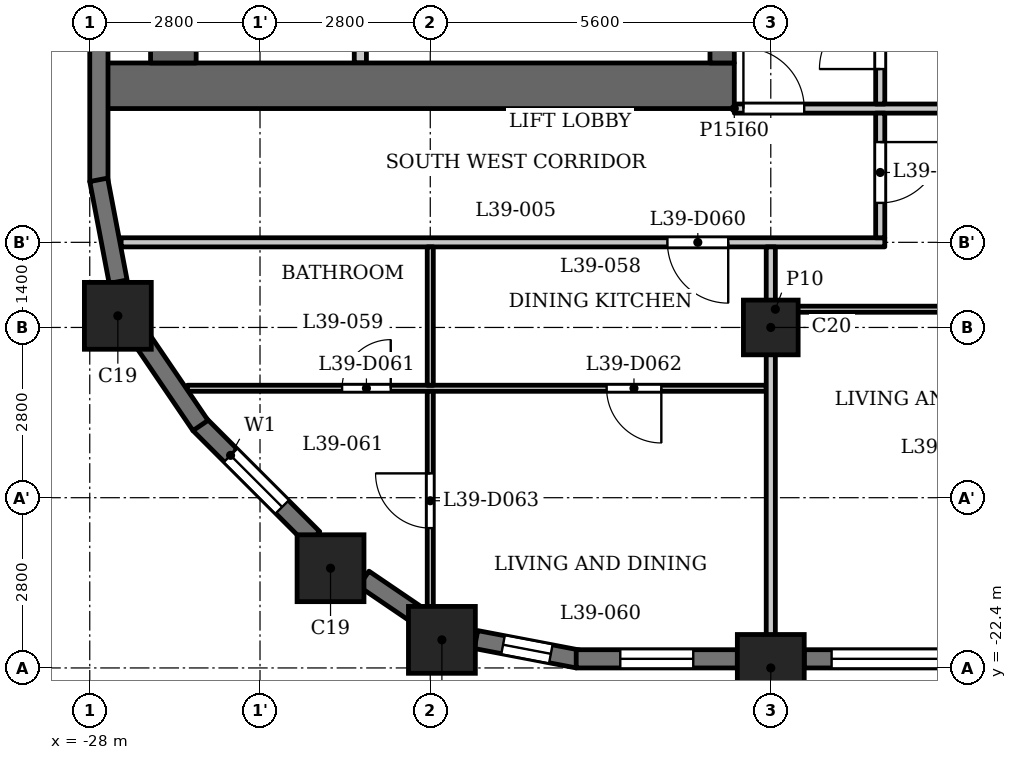
"""IFC4 building model, lengths in metres.
Left out: names, types, materials, properties, quantities, classifications, styles, units other than length and angle.
Written with IfcOpenShell. Run it as: python <this file> out.ifc"""

import sys

from ifc_helpers import new_model, si_unit, direction, frame, frame_2d, origin, origin_2d, place, context, subcontext, project, spatial, rectangle, extrude, element, fill, save


model = new_model("IFC4")
c1 = context("Model", 3, precision=1e-05, world=origin(), true_north=direction((0.0, 1.0)))
c2 = subcontext(c1, "Body", "Model", "MODEL_VIEW")
j1 = project(units=[si_unit("LENGTHUNIT", "METRE"), si_unit("PLANEANGLEUNIT", "RADIAN")], contexts=[c1])
p1 = place(None, origin())
s1 = spatial("IfcSite", under=j1, at=p1, CompositionType="ELEMENT")
p2 = place(p1, origin())
s2 = spatial("IfcBuilding", under=s1, at=p2, CompositionType="ELEMENT")
p3 = place(p2, frame((0.0, 0.0, 153.6)))
s3 = spatial("IfcBuildingStorey", under=s2, at=p3, CompositionType="ELEMENT", Elevation=153.6)
for number, where, z_axis, x_axis in (
    (1, (-22.209, -21.938, 0.0), (0.0, 0.0, 1.0), (1.0, 0.0, 0.0)),
    (2, (-16.8, -22.4, 0.0), (0.0, 0.0, 1.0), (1.0, 0.0, 0.0)),
    (3, (-27.538, -16.609, 0.0), (0.0, 0.0, 1.0), (1.0, 0.0, 0.0)),
    (4, (-24.04, -20.76, 0.0), (0.0, 0.0, 1.0), (1.0, 0.0, 0.0)),
):
    element("IfcColumn", number, at=place(p3, frame(where, z_axis=z_axis, x_axis=x_axis)), inside=s3, PredefinedType="COLUMN", context=c2, shape_type="SweptSolid", body=[
        extrude(rectangle(XDim=1.1, YDim=1.1, at=origin_2d()), origin(), (0.0, 0.0, 1.0), 3.5),
    ])
p4 = place(p3, frame((-16.8, -16.8, 0.0), z_axis=(0.0, 0.0, 1.0), x_axis=(1.0, 0.0, 0.0)))
e5 = element("IfcColumn", 5, at=p4, inside=s3, PredefinedType="COLUMN", context=c2, shape_type="SweptSolid", body=[
    extrude(rectangle(XDim=0.9, YDim=0.9, at=origin_2d()), origin(), (0.0, 0.0, 1.0), 3.5),
])
p5 = place(p3, frame((-26.197, -18.391, 0.0), z_axis=(0.0, 0.0, 1.0), x_axis=(0.707060717099, -0.707152842274, 0.0)))
e6 = element("IfcWall", 6, at=p5, inside=s3, PredefinedType="SOLIDWALL", context=c2, shape_type="SweptSolid", body=[
    extrude(rectangle(XDim=2.65, YDim=0.3, at=frame_2d((1.325, 0.0))), origin(), (0.0, 0.0, 1.0), 2.45),
])
p6 = place(p5, frame((0.725, 0.0, 0.6)))
e7 = element("IfcOpeningElement", 7, at=p6, cuts=e6, PredefinedType="OPENING", context=c2, shape_type="SweptSolid", body=[
    extrude(rectangle(XDim=1.2, YDim=1.55, at=frame_2d((0.6, 0.775))), frame((0.0, 0.16, 0.0), z_axis=(0.0, -1.0, 0.0), x_axis=(1.0, 0.0, 0.0)), (0.0, 0.0, 1.0), 0.32),
])
p7 = place(p3, frame((-23.492, -20.932, 0.0), z_axis=(0.0, 0.0, 1.0), x_axis=(0.826993959827, -0.562210806023, 0.0)))
e8 = element("IfcWall", 8, at=p7, inside=s3, PredefinedType="SOLIDWALL", context=c2, shape_type="SweptSolid", body=[
    extrude(rectangle(XDim=1.077, YDim=0.3, at=frame_2d((0.539, 0.0))), origin(), (0.0, 0.0, 1.0), 3.2),
])
p8 = place(p3, frame((-21.648, -21.933, 0.0), z_axis=(0.0, 0.0, 1.0), x_axis=(0.982297206936, -0.187329114784, 0.0)))
e9 = element("IfcWall", 9, at=p8, inside=s3, PredefinedType="SOLIDWALL", context=c2, shape_type="SweptSolid", body=[
    extrude(rectangle(XDim=1.706, YDim=0.3, at=frame_2d((0.853, 0.0))), origin(), (0.0, 0.0, 1.0), 2.45),
])
p9 = place(p8, frame((0.453, 0.0, 0.6)))
e10 = element("IfcOpeningElement", 10, at=p9, cuts=e9, PredefinedType="OPENING", context=c2, shape_type="SweptSolid", body=[
    extrude(rectangle(XDim=0.8, YDim=1.55, at=frame_2d((0.4, 0.775))), frame((0.0, 0.16, 0.0), z_axis=(0.0, -1.0, 0.0), x_axis=(1.0, 0.0, 0.0)), (0.0, 0.0, 1.0), 0.32),
])
p10 = place(p3, frame((-20.0, -22.25, 0.0), z_axis=(0.0, 0.0, 1.0), x_axis=(1.0, 0.0, 0.0)))
e11 = element("IfcWall", 11, at=p10, inside=s3, PredefinedType="SOLIDWALL", context=c2, shape_type="SweptSolid", body=[
    extrude(rectangle(XDim=2.65, YDim=0.3, at=frame_2d((1.325, 0.0))), origin(), (0.0, 0.0, 1.0), 2.45),
])
p11 = place(p10, frame((0.725, 0.0, 0.6)))
e12 = element("IfcOpeningElement", 12, at=p11, cuts=e11, PredefinedType="OPENING", context=c2, shape_type="SweptSolid", body=[
    extrude(rectangle(XDim=1.2, YDim=1.55, at=frame_2d((0.6, 0.775))), frame((0.0, 0.16, 0.0), z_axis=(0.0, -1.0, 0.0), x_axis=(1.0, 0.0, 0.0)), (0.0, 0.0, 1.0), 0.32),
])
p12 = place(p3, frame((-16.25, -22.25, 0.0), z_axis=(0.0, 0.0, 1.0), x_axis=(1.0, 0.0, 0.0)))
e13 = element("IfcWall", 13, at=p12, inside=s3, PredefinedType="SOLIDWALL", context=c2, shape_type="SweptSolid", body=[
    extrude(rectangle(XDim=4.5, YDim=0.3, at=frame_2d((2.25, 0.0))), origin(), (0.0, 0.0, 1.0), 2.45),
])
p13 = place(p12, frame((0.45, 0.0, 1.2)))
e14 = element("IfcOpeningElement", 14, at=p13, cuts=e13, PredefinedType="OPENING", context=c2, shape_type="SweptSolid", body=[
    extrude(rectangle(XDim=3.6, YDim=0.95, at=frame_2d((1.8, 0.475))), frame((0.0, 0.16, 0.0), z_axis=(0.0, -1.0, 0.0), x_axis=(1.0, 0.0, 0.0)), (0.0, 0.0, 1.0), 0.32),
])
p14 = place(p3, frame((-27.85, -11.75, 0.0), z_axis=(0.0, 0.0, 1.0), x_axis=(0.0, -1.0, 0.0)))
e15 = element("IfcWall", 15, at=p14, inside=s3, PredefinedType="SOLIDWALL", context=c2, shape_type="SweptSolid", body=[
    extrude(rectangle(XDim=2.65, YDim=0.3, at=frame_2d((1.325, 0.0))), origin(), (0.0, 0.0, 1.0), 2.45),
])
p15 = place(p3, frame((-27.853, -14.372, 0.0), z_axis=(0.0, 0.0, 1.0), x_axis=(0.187302784601, -0.982302227871, 0.0)))
e16 = element("IfcWall", 16, at=p15, inside=s3, PredefinedType="SOLIDWALL", context=c2, shape_type="SweptSolid", body=[
    extrude(rectangle(XDim=1.706, YDim=0.3, at=frame_2d((0.853, 0.0))), origin(), (0.0, 0.0, 1.0), 2.45),
])
p16 = place(p3, frame((-27.138, -17.002, 0.0), z_axis=(0.0, 0.0, 1.0), x_axis=(0.562075160946, -0.827086158419, 0.0)))
e17 = element("IfcWall", 17, at=p16, inside=s3, PredefinedType="SOLIDWALL", context=c2, shape_type="SweptSolid", body=[
    extrude(rectangle(XDim=1.706, YDim=0.3, at=frame_2d((0.853, 0.0))), origin(), (0.0, 0.0, 1.0), 2.45),
])
p17 = place(p3, frame((-17.4, -12.825, 0.0), z_axis=(0.0, 0.0, 1.0), x_axis=(-1.0, 0.0, 0.0)))
e18 = element("IfcWall", 18, at=p17, inside=s3, PredefinedType="SHEAR", context=c2, shape_type="SweptSolid", body=[
    extrude(rectangle(XDim=10.4, YDim=0.75, at=frame_2d((5.2, 0.0))), origin(), (0.0, 0.0, 1.0), 3.2),
])
p18 = place(p3, frame((-17.6, -12.45, 0.0), z_axis=(0.0, 0.0, 1.0), x_axis=(0.0, 1.0, 0.0)))
e19 = element("IfcWall", 19, at=p18, inside=s3, PredefinedType="SHEAR", context=c2, shape_type="SweptSolid", body=[
    extrude(rectangle(XDim=24.9, YDim=0.4, at=frame_2d((12.45, 0.0))), origin(), (0.0, 0.0, 1.0), 3.2),
])
p19 = place(p18, frame((6.325, 0.0, 0.0)))
e20 = element("IfcOpeningElement", 20, at=p19, cuts=e19, PredefinedType="OPENING", context=c2, shape_type="SweptSolid", body=[
    extrude(rectangle(XDim=0.9, YDim=2.1, at=frame_2d((0.45, 1.05))), frame((0.0, 0.21, 0.0), z_axis=(0.0, -1.0, 0.0), x_axis=(1.0, 0.0, 0.0)), (0.0, 0.0, 1.0), 0.42),
])
p20 = place(p18, frame((9.925, 0.0, 0.0)))
e21 = element("IfcOpeningElement", 21, at=p20, cuts=e19, PredefinedType="OPENING", context=c2, shape_type="SweptSolid", body=[
    extrude(rectangle(XDim=0.9, YDim=2.1, at=frame_2d((0.45, 1.05))), frame((0.0, 0.21, 0.0), z_axis=(0.0, -1.0, 0.0), x_axis=(1.0, 0.0, 0.0)), (0.0, 0.0, 1.0), 0.42),
])
p21 = place(p18, frame((15.6, 0.0, 0.0)))
e22 = element("IfcOpeningElement", 22, at=p21, cuts=e19, PredefinedType="OPENING", context=c2, shape_type="SweptSolid", body=[
    extrude(rectangle(XDim=1.1, YDim=2.1, at=frame_2d((0.55, 1.05))), frame((0.0, 0.21, 0.0), z_axis=(0.0, -1.0, 0.0), x_axis=(1.0, 0.0, 0.0)), (0.0, 0.0, 1.0), 0.42),
])
p22 = place(p18, frame((18.0, 0.0, 0.0)))
e23 = element("IfcOpeningElement", 23, at=p22, cuts=e19, PredefinedType="OPENING", context=c2, shape_type="SweptSolid", body=[
    extrude(rectangle(XDim=1.1, YDim=2.1, at=frame_2d((0.55, 1.05))), frame((0.0, 0.21, 0.0), z_axis=(0.0, -1.0, 0.0), x_axis=(1.0, 0.0, 0.0)), (0.0, 0.0, 1.0), 0.42),
])
p23 = place(p18, frame((23.025, 0.0, 0.0)))
e24 = element("IfcOpeningElement", 24, at=p23, cuts=e19, PredefinedType="OPENING", context=c2, shape_type="SweptSolid", body=[
    extrude(rectangle(XDim=1.1, YDim=2.1, at=frame_2d((0.55, 1.05))), frame((0.0, 0.21, 0.0), z_axis=(0.0, -1.0, 0.0), x_axis=(1.0, 0.0, 0.0)), (0.0, 0.0, 1.0), 0.42),
])
p24 = place(p18, frame((0.775, 0.0, 0.0)))
e25 = element("IfcOpeningElement", 25, at=p24, cuts=e19, PredefinedType="OPENING", context=c2, shape_type="SweptSolid", body=[
    extrude(rectangle(XDim=1.1, YDim=2.1, at=frame_2d((0.55, 1.05))), frame((0.0, 0.21, 0.0), z_axis=(0.0, -1.0, 0.0), x_axis=(1.0, 0.0, 0.0)), (0.0, 0.0, 1.0), 0.42),
])
p25 = place(p18, frame((12.925, 0.0, 0.0)))
e26 = element("IfcOpeningElement", 26, at=p25, cuts=e19, PredefinedType="OPENING", context=c2, shape_type="SweptSolid", body=[
    extrude(rectangle(XDim=1.8, YDim=2.1, at=frame_2d((0.9, 1.05))), frame((0.0, 0.21, 0.0), z_axis=(0.0, -1.0, 0.0), x_axis=(1.0, 0.0, 0.0)), (0.0, 0.0, 1.0), 0.42),
])
p26 = place(p3, frame((-26.625, -12.45, 0.0), z_axis=(0.0, 0.0, 1.0), x_axis=(0.0, 1.0, 0.0)))
e27 = element("IfcWall", 27, at=p26, inside=s3, PredefinedType="SHEAR", context=c2, shape_type="SweptSolid", body=[
    extrude(rectangle(XDim=24.9, YDim=0.75, at=frame_2d((12.45, 0.0))), origin(), (0.0, 0.0, 1.0), 3.2),
])
p27 = place(p3, frame((-23.55, -12.45, 0.0), z_axis=(0.0, 0.0, 1.0), x_axis=(0.0, 1.0, 0.0)))
e28 = element("IfcWall", 28, at=p27, inside=s3, PredefinedType="PARTITIONING", context=c2, shape_type="SweptSolid", body=[
    extrude(rectangle(XDim=2.65, YDim=0.2, at=frame_2d((1.325, 0.0))), origin(), (0.0, 0.0, 1.0), 3.2),
])
p28 = place(p27, frame((0.875, 0.0, 0.0)))
e29 = element("IfcOpeningElement", 29, at=p28, cuts=e28, PredefinedType="OPENING", context=c2, shape_type="SweptSolid", body=[
    extrude(rectangle(XDim=0.9, YDim=2.1, at=frame_2d((0.45, 1.05))), frame((0.0, 0.11, 0.0), z_axis=(0.0, -1.0, 0.0), x_axis=(1.0, 0.0, 0.0)), (0.0, 0.0, 1.0), 0.22),
])
p29 = place(p3, frame((-26.394, -17.8, 0.0), z_axis=(0.0, 0.0, 1.0), x_axis=(1.0, 0.0, 0.0)))
e30 = element("IfcWall", 30, at=p29, inside=s3, PredefinedType="PARTITIONING", context=c2, shape_type="SweptSolid", body=[
    extrude(rectangle(XDim=9.519, YDim=0.1, at=frame_2d((4.76, 0.0))), origin(), (0.0, 0.0, 1.0), 3.2),
])
p30 = place(p29, frame((2.544, 0.0, 0.0)))
e31 = element("IfcOpeningElement", 31, at=p30, cuts=e30, PredefinedType="OPENING", context=c2, shape_type="SweptSolid", body=[
    extrude(rectangle(XDim=0.8, YDim=2.1, at=frame_2d((0.4, 1.05))), frame((0.0, 0.06, 0.0), z_axis=(0.0, -1.0, 0.0), x_axis=(1.0, 0.0, 0.0)), (0.0, 0.0, 1.0), 0.12),
])
p31 = place(p29, frame((6.894, 0.0, 0.0)))
e32 = element("IfcOpeningElement", 32, at=p31, cuts=e30, PredefinedType="OPENING", context=c2, shape_type="SweptSolid", body=[
    extrude(rectangle(XDim=0.9, YDim=2.1, at=frame_2d((0.45, 1.05))), frame((0.0, 0.06, 0.0), z_axis=(0.0, -1.0, 0.0), x_axis=(1.0, 0.0, 0.0)), (0.0, 0.0, 1.0), 0.12),
])
p32 = place(p3, frame((-16.725, -16.5, 0.0), z_axis=(0.0, 0.0, 1.0), x_axis=(1.0, 0.0, 0.0)))
e33 = element("IfcWall", 33, at=p32, inside=s3, PredefinedType="PARTITIONING", context=c2, shape_type="SweptSolid", body=[
    extrude(rectangle(XDim=33.45, YDim=0.1, at=frame_2d((16.725, 0.0))), origin(), (0.0, 0.0, 1.0), 3.2),
])
p33 = place(p32, frame((9.675, 0.0, 0.0)))
e34 = element("IfcOpeningElement", 34, at=p33, cuts=e33, PredefinedType="OPENING", context=c2, shape_type="SweptSolid", body=[
    extrude(rectangle(XDim=0.8, YDim=2.1, at=frame_2d((0.4, 1.05))), frame((0.0, 0.06, 0.0), z_axis=(0.0, -1.0, 0.0), x_axis=(1.0, 0.0, 0.0)), (0.0, 0.0, 1.0), 0.12),
])
p34 = place(p32, frame((4.075, 0.0, 0.0)))
e35 = element("IfcOpeningElement", 35, at=p34, cuts=e33, PredefinedType="OPENING", context=c2, shape_type="SweptSolid", body=[
    extrude(rectangle(XDim=0.9, YDim=2.1, at=frame_2d((0.45, 1.05))), frame((0.0, 0.06, 0.0), z_axis=(0.0, -1.0, 0.0), x_axis=(1.0, 0.0, 0.0)), (0.0, 0.0, 1.0), 0.12),
])
p35 = place(p32, frame((20.875, 0.0, 0.0)))
e36 = element("IfcOpeningElement", 36, at=p35, cuts=e33, PredefinedType="OPENING", context=c2, shape_type="SweptSolid", body=[
    extrude(rectangle(XDim=0.8, YDim=2.1, at=frame_2d((0.4, 1.05))), frame((0.0, 0.06, 0.0), z_axis=(0.0, -1.0, 0.0), x_axis=(1.0, 0.0, 0.0)), (0.0, 0.0, 1.0), 0.12),
])
p36 = place(p32, frame((15.275, 0.0, 0.0)))
e37 = element("IfcOpeningElement", 37, at=p36, cuts=e33, PredefinedType="OPENING", context=c2, shape_type="SweptSolid", body=[
    extrude(rectangle(XDim=0.9, YDim=2.1, at=frame_2d((0.45, 1.05))), frame((0.0, 0.06, 0.0), z_axis=(0.0, -1.0, 0.0), x_axis=(1.0, 0.0, 0.0)), (0.0, 0.0, 1.0), 0.12),
])
p37 = place(p32, frame((26.475, 0.0, 0.0)))
e38 = element("IfcOpeningElement", 38, at=p37, cuts=e33, PredefinedType="OPENING", context=c2, shape_type="SweptSolid", body=[
    extrude(rectangle(XDim=0.8, YDim=2.1, at=frame_2d((0.4, 1.05))), frame((0.0, 0.06, 0.0), z_axis=(0.0, -1.0, 0.0), x_axis=(1.0, 0.0, 0.0)), (0.0, 0.0, 1.0), 0.12),
])
p38 = place(p32, frame((30.575, 0.0, 0.0)))
e39 = element("IfcOpeningElement", 39, at=p38, cuts=e33, PredefinedType="OPENING", context=c2, shape_type="SweptSolid", body=[
    extrude(rectangle(XDim=0.9, YDim=2.1, at=frame_2d((0.45, 1.05))), frame((0.0, 0.06, 0.0), z_axis=(0.0, -1.0, 0.0), x_axis=(1.0, 0.0, 0.0)), (0.0, 0.0, 1.0), 0.12),
])
p39 = place(p3, frame((-27.484, -15.4, 0.0), z_axis=(0.0, 0.0, 1.0), x_axis=(1.0, 0.0, 0.0)))
e40 = element("IfcWall", 40, at=p39, inside=s3, PredefinedType="PARTITIONING", context=c2, shape_type="SweptSolid", body=[
    extrude(rectangle(XDim=12.559, YDim=0.15, at=frame_2d((6.279, 0.0))), origin(), (0.0, 0.0, 1.0), 3.2),
])
p40 = place(p39, frame((8.984, 0.0, 0.0)))
e41 = element("IfcOpeningElement", 41, at=p40, cuts=e40, PredefinedType="OPENING", context=c2, shape_type="SweptSolid", body=[
    extrude(rectangle(XDim=1.0, YDim=2.1, at=frame_2d((0.5, 1.05))), frame((0.0, 0.085, 0.0), z_axis=(0.0, -1.0, 0.0), x_axis=(1.0, 0.0, 0.0)), (0.0, 0.0, 1.0), 0.17),
])
p41 = place(p3, frame((-17.4, -13.2, 0.0), z_axis=(0.0, 0.0, 1.0), x_axis=(1.0, 0.0, 0.0)))
e42 = element("IfcWall", 42, at=p41, inside=s3, PredefinedType="PARTITIONING", context=c2, shape_type="SweptSolid", body=[
    extrude(rectangle(XDim=34.8, YDim=0.15, at=frame_2d((17.4, 0.0))), origin(), (0.0, 0.0, 1.0), 3.2),
])
p42 = place(p41, frame((0.15, 0.0, 0.0)))
e43 = element("IfcOpeningElement", 43, at=p42, cuts=e42, PredefinedType="OPENING", context=c2, shape_type="SweptSolid", body=[
    extrude(rectangle(XDim=1.0, YDim=2.1, at=frame_2d((0.5, 1.05))), frame((0.0, 0.085, 0.0), z_axis=(0.0, -1.0, 0.0), x_axis=(1.0, 0.0, 0.0)), (0.0, 0.0, 1.0), 0.17),
])
p43 = place(p41, frame((33.55, 0.0, 0.0)))
e44 = element("IfcOpeningElement", 44, at=p43, cuts=e42, PredefinedType="OPENING", context=c2, shape_type="SweptSolid", body=[
    extrude(rectangle(XDim=1.0, YDim=2.1, at=frame_2d((0.5, 1.05))), frame((0.0, 0.085, 0.0), z_axis=(0.0, -1.0, 0.0), x_axis=(1.0, 0.0, 0.0)), (0.0, 0.0, 1.0), 0.17),
])
p44 = place(p41, frame((15.7, 0.0, 0.0)))
e45 = element("IfcOpeningElement", 45, at=p44, cuts=e42, PredefinedType="OPENING", context=c2, shape_type="SweptSolid", body=[
    extrude(rectangle(XDim=1.0, YDim=2.1, at=frame_2d((0.5, 1.05))), frame((0.0, 0.085, 0.0), z_axis=(0.0, -1.0, 0.0), x_axis=(1.0, 0.0, 0.0)), (0.0, 0.0, 1.0), 0.17),
])
p45 = place(p3, frame((-22.4, -21.72, 0.0), z_axis=(0.0, 0.0, 1.0), x_axis=(0.0, 1.0, 0.0)))
e46 = element("IfcWall", 46, at=p45, inside=s3, PredefinedType="PARTITIONING", context=c2, shape_type="SweptSolid", body=[
    extrude(rectangle(XDim=3.87, YDim=0.1, at=frame_2d((1.935, 0.0))), origin(), (0.0, 0.0, 1.0), 3.2),
])
p46 = place(p45, frame((1.62, 0.0, 0.0)))
e47 = element("IfcOpeningElement", 47, at=p46, cuts=e46, PredefinedType="OPENING", context=c2, shape_type="SweptSolid", body=[
    extrude(rectangle(XDim=0.9, YDim=2.1, at=frame_2d((0.45, 1.05))), frame((0.0, 0.06, 0.0), z_axis=(0.0, -1.0, 0.0), x_axis=(1.0, 0.0, 0.0)), (0.0, 0.0, 1.0), 0.12),
])
p47 = place(p3, frame((-22.4, -17.75, 0.0), z_axis=(0.0, 0.0, 1.0), x_axis=(0.0, 1.0, 0.0)))
e48 = element("IfcWall", 48, at=p47, inside=s3, PredefinedType="PARTITIONING", context=c2, shape_type="SweptSolid", body=[
    extrude(rectangle(XDim=2.275, YDim=0.1, at=frame_2d((1.137, 0.0))), origin(), (0.0, 0.0, 1.0), 3.2),
])
p48 = place(p3, frame((-16.8, -22.93, 0.0), z_axis=(0.0, 0.0, 1.0), x_axis=(0.0, 1.0, 0.0)))
e49 = element("IfcWall", 49, at=p48, inside=s3, PredefinedType="PARTITIONING", context=c2, shape_type="SweptSolid", body=[
    extrude(rectangle(XDim=7.455, YDim=0.15, at=frame_2d((3.728, 0.0))), origin(), (0.0, 0.0, 1.0), 3.2),
])
p49 = place(p3, frame((-15.0, -15.325, 0.0), z_axis=(0.0, 0.0, 1.0), x_axis=(0.0, 1.0, 0.0)))
e50 = element("IfcWall", 50, at=p49, inside=s3, PredefinedType="PARTITIONING", context=c2, shape_type="SweptSolid", body=[
    extrude(rectangle(XDim=2.05, YDim=0.15, at=frame_2d((1.025, 0.0))), origin(), (0.0, 0.0, 1.0), 3.2),
])
p50 = place(p49, frame((0.574, 0.0, 0.0)))
e51 = element("IfcOpeningElement", 51, at=p50, cuts=e50, PredefinedType="OPENING", context=c2, shape_type="SweptSolid", body=[
    extrude(rectangle(XDim=1.0, YDim=2.1, at=frame_2d((0.5, 1.05))), frame((0.0, 0.085, 0.0), z_axis=(0.0, -1.0, 0.0), x_axis=(1.0, 0.0, 0.0)), (0.0, 0.0, 1.0), 0.17),
])
p51 = place(p3, frame((-15.0, -13.125, 0.0), z_axis=(0.0, 0.0, 1.0), x_axis=(0.0, 1.0, 0.0)))
e52 = element("IfcWall", 52, at=p51, inside=s3, PredefinedType="PARTITIONING", context=c2, shape_type="SweptSolid", body=[
    extrude(rectangle(XDim=6.356, YDim=0.15, at=frame_2d((3.178, 0.0))), origin(), (0.0, 0.0, 1.0), 3.2),
])
p52 = place(p51, frame((0.575, 0.0, 0.0)))
e53 = element("IfcOpeningElement", 53, at=p52, cuts=e52, PredefinedType="OPENING", context=c2, shape_type="SweptSolid", body=[
    extrude(rectangle(XDim=1.0, YDim=2.1, at=frame_2d((0.5, 1.05))), frame((0.0, 0.085, 0.0), z_axis=(0.0, -1.0, 0.0), x_axis=(1.0, 0.0, 0.0)), (0.0, 0.0, 1.0), 0.17),
])
p53 = place(p52, origin())
e54 = element("IfcDoor", 54, at=p53, inside=s3, OperationType="SINGLE_SWING_RIGHT", PredefinedType="DOOR", context=c2, shape_type="SweptSolid", body=[
    extrude(rectangle(XDim=1.0, YDim=2.1, at=frame_2d((0.5, 1.05))), frame((0.0, 0.025, 0.0), z_axis=(0.0, -1.0, 0.0), x_axis=(1.0, 0.0, 0.0)), (0.0, 0.0, 1.0), 0.05),
])
fill(e53, e54)
p54 = place(p42, origin())
e55 = element("IfcDoor", 55, at=p54, inside=s3, OperationType="SINGLE_SWING_RIGHT", PredefinedType="DOOR", context=c2, shape_type="SweptSolid", body=[
    extrude(rectangle(XDim=1.0, YDim=2.1, at=frame_2d((0.5, 1.05))), frame((0.0, 0.025, 0.0), z_axis=(0.0, -1.0, 0.0), x_axis=(1.0, 0.0, 0.0)), (0.0, 0.0, 1.0), 0.05),
])
fill(e43, e55)
p55 = place(p50, origin())
e56 = element("IfcDoor", 56, at=p55, inside=s3, OperationType="SINGLE_SWING_RIGHT", PredefinedType="DOOR", context=c2, shape_type="SweptSolid", body=[
    extrude(rectangle(XDim=1.0, YDim=2.1, at=frame_2d((0.5, 1.05))), frame((0.0, 0.025, 0.0), z_axis=(0.0, -1.0, 0.0), x_axis=(1.0, 0.0, 0.0)), (0.0, 0.0, 1.0), 0.05),
])
fill(e51, e56)
p56 = place(p40, origin())
e57 = element("IfcDoor", 57, at=p56, inside=s3, OperationType="SINGLE_SWING_RIGHT", PredefinedType="DOOR", context=c2, shape_type="SweptSolid", body=[
    extrude(rectangle(XDim=1.0, YDim=2.1, at=frame_2d((0.5, 1.05))), frame((0.0, 0.025, 0.0), z_axis=(0.0, -1.0, 0.0), x_axis=(1.0, 0.0, 0.0)), (0.0, 0.0, 1.0), 0.05),
])
fill(e41, e57)
p57 = place(p30, origin())
e58 = element("IfcDoor", 58, at=p57, inside=s3, OperationType="SINGLE_SWING_LEFT", PredefinedType="DOOR", context=c2, shape_type="SweptSolid", body=[
    extrude(rectangle(XDim=0.8, YDim=2.1, at=frame_2d((0.4, 1.05))), frame((0.0, 0.025, 0.0), z_axis=(0.0, -1.0, 0.0), x_axis=(1.0, 0.0, 0.0)), (0.0, 0.0, 1.0), 0.05),
])
fill(e31, e58)
p58 = place(p31, origin())
e59 = element("IfcDoor", 59, at=p58, inside=s3, OperationType="SINGLE_SWING_RIGHT", PredefinedType="DOOR", context=c2, shape_type="SweptSolid", body=[
    extrude(rectangle(XDim=0.9, YDim=2.1, at=frame_2d((0.45, 1.05))), frame((0.0, 0.025, 0.0), z_axis=(0.0, -1.0, 0.0), x_axis=(1.0, 0.0, 0.0)), (0.0, 0.0, 1.0), 0.05),
])
fill(e32, e59)
p59 = place(p46, origin())
e60 = element("IfcDoor", 60, at=p59, inside=s3, OperationType="SINGLE_SWING_LEFT", PredefinedType="DOOR", context=c2, shape_type="SweptSolid", body=[
    extrude(rectangle(XDim=0.9, YDim=2.1, at=frame_2d((0.45, 1.05))), frame((0.0, 0.025, 0.0), z_axis=(0.0, -1.0, 0.0), x_axis=(1.0, 0.0, 0.0)), (0.0, 0.0, 1.0), 0.05),
])
fill(e47, e60)
p60 = place(p6, origin())
e61 = element("IfcWindow", 61, at=p60, inside=s3, PartitioningType="SINGLE_PANEL", PredefinedType="WINDOW", context=c2, shape_type="SweptSolid", body=[
    extrude(rectangle(XDim=1.2, YDim=1.55, at=frame_2d((0.6, 0.775))), frame((0.0, 0.03, 0.0), z_axis=(0.0, -1.0, 0.0), x_axis=(1.0, 0.0, 0.0)), (0.0, 0.0, 1.0), 0.06),
])
fill(e7, e61)
p61 = place(p9, origin())
e62 = element("IfcWindow", 62, at=p61, inside=s3, PartitioningType="SINGLE_PANEL", PredefinedType="WINDOW", context=c2, shape_type="SweptSolid", body=[
    extrude(rectangle(XDim=0.8, YDim=1.55, at=frame_2d((0.4, 0.775))), frame((0.0, 0.03, 0.0), z_axis=(0.0, -1.0, 0.0), x_axis=(1.0, 0.0, 0.0)), (0.0, 0.0, 1.0), 0.06),
])
fill(e10, e62)
p62 = place(p11, origin())
e63 = element("IfcWindow", 63, at=p62, inside=s3, PartitioningType="SINGLE_PANEL", PredefinedType="WINDOW", context=c2, shape_type="SweptSolid", body=[
    extrude(rectangle(XDim=1.2, YDim=1.55, at=frame_2d((0.6, 0.775))), frame((0.0, 0.03, 0.0), z_axis=(0.0, -1.0, 0.0), x_axis=(1.0, 0.0, 0.0)), (0.0, 0.0, 1.0), 0.06),
])
fill(e12, e63)
p63 = place(p13, origin())
e64 = element("IfcWindow", 64, at=p63, inside=s3, PartitioningType="SINGLE_PANEL", PredefinedType="WINDOW", context=c2, shape_type="SweptSolid", body=[
    extrude(rectangle(XDim=3.6, YDim=0.95, at=frame_2d((1.8, 0.475))), frame((0.0, 0.03, 0.0), z_axis=(0.0, -1.0, 0.0), x_axis=(1.0, 0.0, 0.0)), (0.0, 0.0, 1.0), 0.06),
])
fill(e14, e64)
save(model, sys.argv[1])
